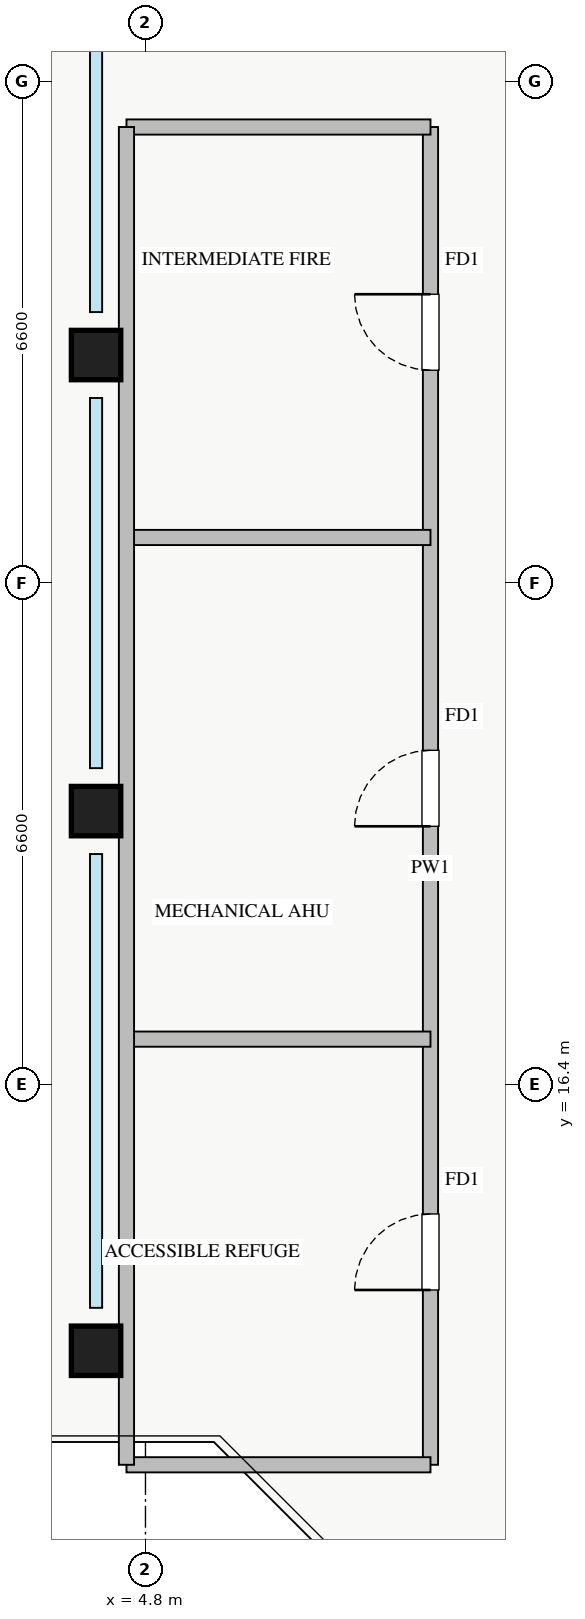
"""IFC4 building model, lengths in metres.
Left out: names, types, materials, properties, quantities, classifications, styles, units other than length and angle.
Written with IfcOpenShell. Run it as: python <this file> out.ifc"""

import sys

from ifc_helpers import new_model, si_unit, direction, frame, frame_2d, origin, origin_2d, place, context, subcontext, project, spatial, rectangle, extrude, source, transform, mapped, element, fill, save


model = new_model("IFC4")
c1 = context("Model", 3, precision=1e-05, world=origin(), true_north=direction((0.0, 1.0)))
c2 = subcontext(c1, "Body", "Model", "MODEL_VIEW")
j1 = project(units=[si_unit("LENGTHUNIT", "METRE"), si_unit("PLANEANGLEUNIT", "RADIAN")], contexts=[c1])
p1 = place(None, origin())
s1 = spatial("IfcSite", under=j1, at=p1, CompositionType="ELEMENT")
p2 = place(p1, origin())
s2 = spatial("IfcBuilding", under=s1, at=p2, CompositionType="ELEMENT")
p3 = place(p2, frame((0.0, 0.0, 263.25)))
s3 = spatial("IfcBuildingStorey", under=s2, at=p3, CompositionType="ELEMENT", Elevation=263.25)
m1 = source(origin(), c2, "Body", "SweptSolid", [
    extrude(rectangle(XDim=0.65, YDim=0.65, at=origin_2d()), origin(), (0.0, 0.0, 1.0), 4.5),
])
for number, where, z_axis, x_axis in (
    (1, (4.15, 26.0, 0.0), (0.0, 0.0, 1.0), (1.0, 0.0, 0.0)),
    (2, (4.15, 20.0, 0.0), (0.0, 0.0, 1.0), (1.0, 0.0, 0.0)),
    (3, (4.15, 12.9, 0.0), (0.0, 0.0, 1.0), (1.0, 0.0, 0.0)),
):
    element("IfcColumn", number, at=place(p3, frame(where, z_axis=z_axis, x_axis=x_axis)), inside=s3, PredefinedType="COLUMN", context=c2, shape_type="MappedRepresentation", body=[
        mapped(m1, transform((0.0, 0.0, 0.0), x_axis=(1.0, 0.0, 0.0), y_axis=(0.0, 1.0, 0.0), z_axis=(0.0, 0.0, 1.0), scale=1.0)),
    ])
p4 = place(p3, frame((8.55, 11.4, 0.0), z_axis=(0.0, 0.0, 1.0), x_axis=(0.0, 1.0, 0.0)))
e4 = element("IfcWall", 4, at=p4, inside=s3, PredefinedType="PARTITIONING", context=c2, shape_type="SweptSolid", body=[
    extrude(rectangle(XDim=17.6, YDim=0.2, at=frame_2d((8.8, 0.0))), origin(), (0.0, 0.0, 1.0), 4.25),
])
p5 = place(p4, frame((8.4, 0.0, 0.0)))
e5 = element("IfcOpeningElement", 5, at=p5, cuts=e4, PredefinedType="OPENING", context=c2, shape_type="SweptSolid", body=[
    extrude(rectangle(XDim=1.0, YDim=2.05, at=frame_2d((0.5, 1.025))), frame((0.0, 0.11, 0.0), z_axis=(0.0, -1.0, 0.0), x_axis=(1.0, 0.0, 0.0)), (0.0, 0.0, 1.0), 0.22),
])
p6 = place(p4, frame((14.4, 0.0, 0.0)))
e6 = element("IfcOpeningElement", 6, at=p6, cuts=e4, PredefinedType="OPENING", context=c2, shape_type="SweptSolid", body=[
    extrude(rectangle(XDim=1.0, YDim=2.05, at=frame_2d((0.5, 1.025))), frame((0.0, 0.11, 0.0), z_axis=(0.0, -1.0, 0.0), x_axis=(1.0, 0.0, 0.0)), (0.0, 0.0, 1.0), 0.22),
])
p7 = place(p4, frame((2.3, 0.0, 0.0)))
e7 = element("IfcOpeningElement", 7, at=p7, cuts=e4, PredefinedType="OPENING", context=c2, shape_type="SweptSolid", body=[
    extrude(rectangle(XDim=1.0, YDim=2.05, at=frame_2d((0.5, 1.025))), frame((0.0, 0.11, 0.0), z_axis=(0.0, -1.0, 0.0), x_axis=(1.0, 0.0, 0.0)), (0.0, 0.0, 1.0), 0.22),
])
for number, where, z_axis, x_axis in (
    (8, (4.55, 11.4, 0.0), (0.0, 0.0, 1.0), (1.0, 0.0, 0.0)),
    (9, (4.55, 17.0, 0.0), (0.0, 0.0, 1.0), (1.0, 0.0, 0.0)),
    (10, (4.55, 23.6, 0.0), (0.0, 0.0, 1.0), (1.0, 0.0, 0.0)),
    (11, (4.55, 29.0, 0.0), (0.0, 0.0, 1.0), (1.0, 0.0, 0.0)),
):
    element("IfcWall", number, at=place(p3, frame(where, z_axis=z_axis, x_axis=x_axis)), inside=s3, PredefinedType="PARTITIONING", context=c2, shape_type="SweptSolid", body=[
        extrude(rectangle(XDim=4.0, YDim=0.2, at=frame_2d((2.0, 0.0))), origin(), (0.0, 0.0, 1.0), 4.25),
    ])
p8 = place(p3, frame((4.55, 11.4, 0.0), z_axis=(0.0, 0.0, 1.0), x_axis=(0.0, 1.0, 0.0)))
e12 = element("IfcWall", 12, at=p8, inside=s3, PredefinedType="PARTITIONING", context=c2, shape_type="SweptSolid", body=[
    extrude(rectangle(XDim=17.6, YDim=0.2, at=frame_2d((8.8, 0.0))), origin(), (0.0, 0.0, 1.0), 4.25),
])
m2 = source(origin(), c2, "Body", "SweptSolid", [
    extrude(rectangle(XDim=1.0, YDim=2.05, at=frame_2d((0.5, 1.025))), frame((0.0, 0.025, 0.0), z_axis=(0.0, -1.0, 0.0), x_axis=(1.0, 0.0, 0.0)), (0.0, 0.0, 1.0), 0.05),
])
p9 = place(p5, origin())
e13 = element("IfcDoor", 13, at=p9, inside=s3, OperationType="SINGLE_SWING_LEFT", PredefinedType="DOOR", context=c2, shape_type="MappedRepresentation", body=[
    mapped(m2, transform((0.0, 0.0, 0.0), x_axis=(1.0, 0.0, 0.0), y_axis=(0.0, 1.0, 0.0), z_axis=(0.0, 0.0, 1.0), scale=1.0)),
])
fill(e5, e13)
p10 = place(p6, origin())
e14 = element("IfcDoor", 14, at=p10, inside=s3, OperationType="SINGLE_SWING_RIGHT", PredefinedType="DOOR", context=c2, shape_type="MappedRepresentation", body=[
    mapped(m2, transform((0.0, 0.0, 0.0), x_axis=(1.0, 0.0, 0.0), y_axis=(0.0, 1.0, 0.0), z_axis=(0.0, 0.0, 1.0), scale=1.0)),
])
fill(e6, e14)
p11 = place(p7, origin())
e15 = element("IfcDoor", 15, at=p11, inside=s3, OperationType="SINGLE_SWING_LEFT", PredefinedType="DOOR", context=c2, shape_type="MappedRepresentation", body=[
    mapped(m2, transform((0.0, 0.0, 0.0), x_axis=(1.0, 0.0, 0.0), y_axis=(0.0, 1.0, 0.0), z_axis=(0.0, 0.0, 1.0), scale=1.0)),
])
fill(e7, e15)
save(model, sys.argv[1])
